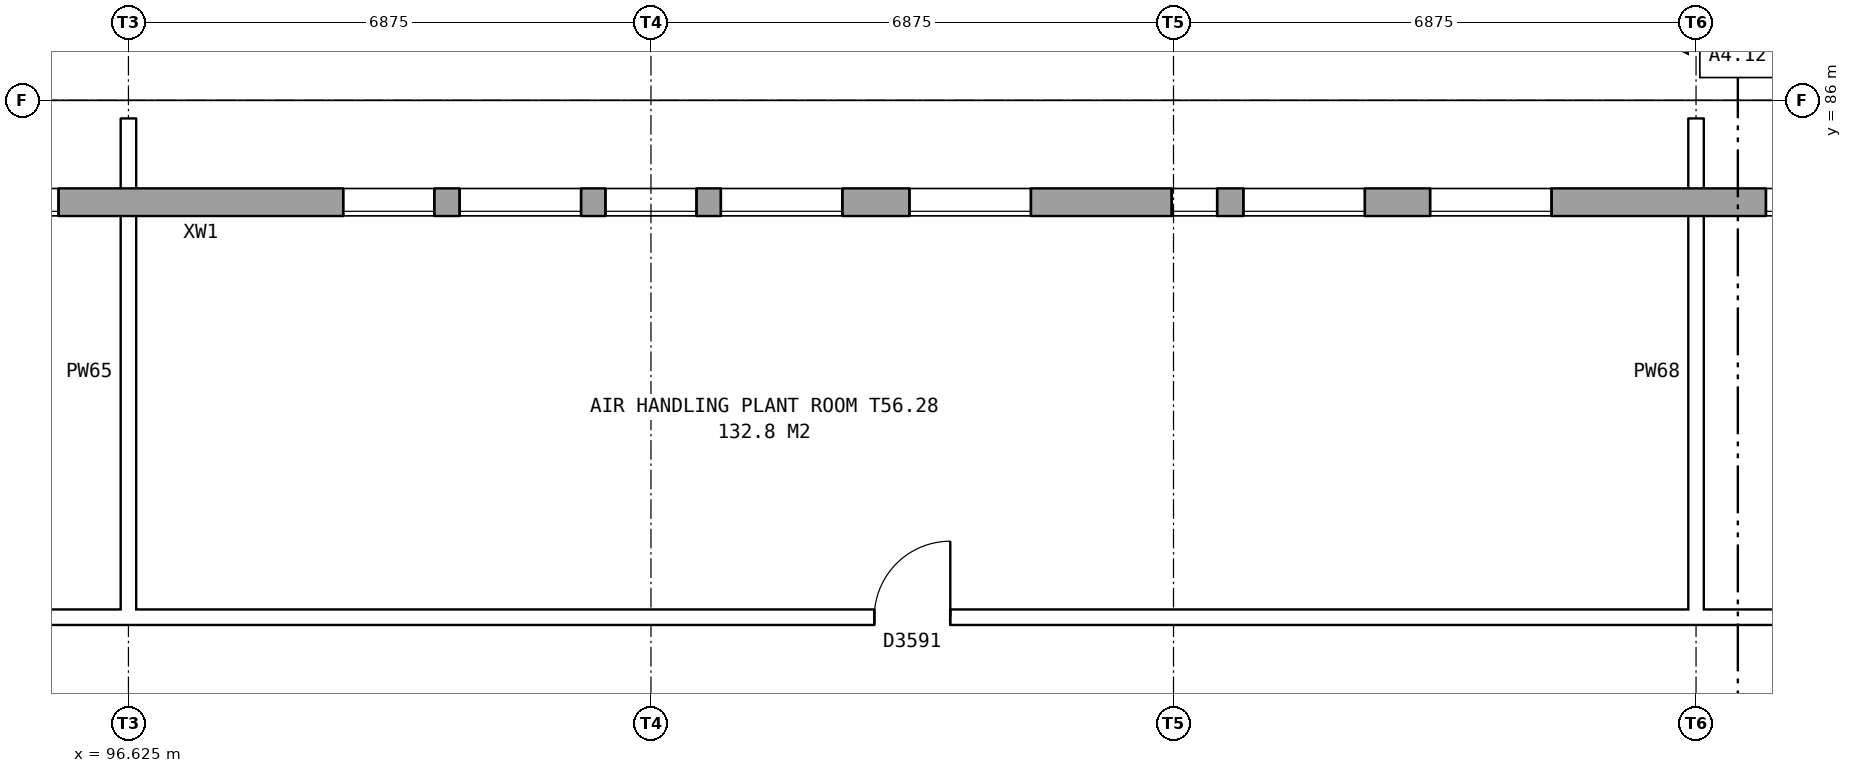
"""IFC4 building model, lengths in metres.
Left out: names, types, materials, properties, quantities, classifications, styles, units other than length and angle.
Written with IfcOpenShell. Run it as: python <this file> out.ifc"""

import sys

from ifc_helpers import new_model, si_unit, direction, frame, frame_2d, origin, place, context, subcontext, project, spatial, rectangle, extrude, element, fill, save


model = new_model("IFC4")
c1 = context("Model", 3, precision=1e-05, world=origin(), true_north=direction((0.0, 1.0)))
c2 = subcontext(c1, "Body", "Model", "MODEL_VIEW")
j1 = project(units=[si_unit("LENGTHUNIT", "METRE"), si_unit("PLANEANGLEUNIT", "RADIAN")], contexts=[c1])
p1 = place(None, origin())
s1 = spatial("IfcSite", under=j1, at=p1, CompositionType="ELEMENT")
p2 = place(p1, origin())
s2 = spatial("IfcBuilding", under=s1, at=p2, CompositionType="ELEMENT")
p3 = place(p2, frame((0.0, 0.0, 198.6)))
s3 = spatial("IfcBuildingStorey", under=s2, at=p3, CompositionType="ELEMENT", Elevation=198.6)
p4 = place(p3, frame((130.85, 84.66, 0.0), z_axis=(0.0, 0.0, 1.0), x_axis=(-1.0, 0.0, 0.0)))
e1 = element("IfcWall", 1, at=p4, inside=s3, PredefinedType="STANDARD", context=c2, shape_type="SweptSolid", body=[
    extrude(rectangle(XDim=54.7, YDim=0.36, at=frame_2d((27.35, 0.0))), origin(), (0.0, 0.0, 1.0), 3.7),
])
p5 = place(p4, frame((1.75, 0.0, 1.5)))
e2 = element("IfcOpeningElement", 2, at=p5, cuts=e1, PredefinedType="OPENING", context=c2, shape_type="SweptSolid", body=[
    extrude(rectangle(XDim=0.6, YDim=1.2, at=frame_2d((0.3, 0.6))), frame((0.0, 0.19, 0.0), z_axis=(0.0, -1.0, 0.0), x_axis=(1.0, 0.0, 0.0)), (0.0, 0.0, 1.0), 0.38),
])
p6 = place(p4, frame((4.206, 0.0, 1.5)))
e3 = element("IfcOpeningElement", 3, at=p6, cuts=e1, PredefinedType="OPENING", context=c2, shape_type="SweptSolid", body=[
    extrude(rectangle(XDim=1.6, YDim=1.2, at=frame_2d((0.8, 0.6))), frame((0.0, 0.19, 0.0), z_axis=(0.0, -1.0, 0.0), x_axis=(1.0, 0.0, 0.0)), (0.0, 0.0, 1.0), 0.38),
])
p7 = place(p4, frame((2.65, 0.0, 1.5)))
e4 = element("IfcOpeningElement", 4, at=p7, cuts=e1, PredefinedType="OPENING", context=c2, shape_type="SweptSolid", body=[
    extrude(rectangle(XDim=1.2, YDim=1.2, at=frame_2d((0.6, 0.6))), frame((0.0, 0.19, 0.0), z_axis=(0.0, -1.0, 0.0), x_axis=(1.0, 0.0, 0.0)), (0.0, 0.0, 1.0), 0.38),
])
p8 = place(p4, frame((11.081, 0.0, 1.5)))
e5 = element("IfcOpeningElement", 5, at=p8, cuts=e1, PredefinedType="OPENING", context=c2, shape_type="SweptSolid", body=[
    extrude(rectangle(XDim=1.6, YDim=1.2, at=frame_2d((0.8, 0.6))), frame((0.0, 0.19, 0.0), z_axis=(0.0, -1.0, 0.0), x_axis=(1.0, 0.0, 0.0)), (0.0, 0.0, 1.0), 0.38),
])
p9 = place(p4, frame((15.5, 0.0, 1.5)))
e6 = element("IfcOpeningElement", 6, at=p9, cuts=e1, PredefinedType="OPENING", context=c2, shape_type="SweptSolid", body=[
    extrude(rectangle(XDim=1.6, YDim=1.2, at=frame_2d((0.8, 0.6))), frame((0.0, 0.19, 0.0), z_axis=(0.0, -1.0, 0.0), x_axis=(1.0, 0.0, 0.0)), (0.0, 0.0, 1.0), 0.38),
])
p10 = place(p4, frame((17.956, 0.0, 1.5)))
e7 = element("IfcOpeningElement", 7, at=p10, cuts=e1, PredefinedType="OPENING", context=c2, shape_type="SweptSolid", body=[
    extrude(rectangle(XDim=1.6, YDim=1.2, at=frame_2d((0.8, 0.6))), frame((0.0, 0.19, 0.0), z_axis=(0.0, -1.0, 0.0), x_axis=(1.0, 0.0, 0.0)), (0.0, 0.0, 1.0), 0.38),
])
p11 = place(p4, frame((19.9, 0.0, 1.5)))
e8 = element("IfcOpeningElement", 8, at=p11, cuts=e1, PredefinedType="OPENING", context=c2, shape_type="SweptSolid", body=[
    extrude(rectangle(XDim=0.6, YDim=1.2, at=frame_2d((0.3, 0.6))), frame((0.0, 0.19, 0.0), z_axis=(0.0, -1.0, 0.0), x_axis=(1.0, 0.0, 0.0)), (0.0, 0.0, 1.0), 0.38),
])
p12 = place(p4, frame((24.831, 0.0, 1.5)))
e9 = element("IfcOpeningElement", 9, at=p12, cuts=e1, PredefinedType="OPENING", context=c2, shape_type="SweptSolid", body=[
    extrude(rectangle(XDim=1.6, YDim=1.2, at=frame_2d((0.8, 0.6))), frame((0.0, 0.19, 0.0), z_axis=(0.0, -1.0, 0.0), x_axis=(1.0, 0.0, 0.0)), (0.0, 0.0, 1.0), 0.38),
])
p13 = place(p4, frame((28.269, 0.0, 1.5)))
e10 = element("IfcOpeningElement", 10, at=p13, cuts=e1, PredefinedType="OPENING", context=c2, shape_type="SweptSolid", body=[
    extrude(rectangle(XDim=1.6, YDim=1.2, at=frame_2d((0.8, 0.6))), frame((0.0, 0.19, 0.0), z_axis=(0.0, -1.0, 0.0), x_axis=(1.0, 0.0, 0.0)), (0.0, 0.0, 1.0), 0.38),
])
p14 = place(p4, frame((22.35, 0.0, 1.5)))
e11 = element("IfcOpeningElement", 11, at=p14, cuts=e1, PredefinedType="OPENING", context=c2, shape_type="SweptSolid", body=[
    extrude(rectangle(XDim=1.6, YDim=1.2, at=frame_2d((0.8, 0.6))), frame((0.0, 0.19, 0.0), z_axis=(0.0, -1.0, 0.0), x_axis=(1.0, 0.0, 0.0)), (0.0, 0.0, 1.0), 0.38),
])
p15 = place(p4, frame((35.144, 0.0, 1.5)))
e12 = element("IfcOpeningElement", 12, at=p15, cuts=e1, PredefinedType="OPENING", context=c2, shape_type="SweptSolid", body=[
    extrude(rectangle(XDim=1.6, YDim=1.2, at=frame_2d((0.8, 0.6))), frame((0.0, 0.19, 0.0), z_axis=(0.0, -1.0, 0.0), x_axis=(1.0, 0.0, 0.0)), (0.0, 0.0, 1.0), 0.38),
])
p16 = place(p4, frame((37.075, 0.0, 1.5)))
e13 = element("IfcOpeningElement", 13, at=p16, cuts=e1, PredefinedType="OPENING", context=c2, shape_type="SweptSolid", body=[
    extrude(rectangle(XDim=0.6, YDim=1.2, at=frame_2d((0.3, 0.6))), frame((0.0, 0.19, 0.0), z_axis=(0.0, -1.0, 0.0), x_axis=(1.0, 0.0, 0.0)), (0.0, 0.0, 1.0), 0.38),
])
p17 = place(p4, frame((42.019, 0.0, 1.5)))
e14 = element("IfcOpeningElement", 14, at=p17, cuts=e1, PredefinedType="OPENING", context=c2, shape_type="SweptSolid", body=[
    extrude(rectangle(XDim=1.6, YDim=1.2, at=frame_2d((0.8, 0.6))), frame((0.0, 0.19, 0.0), z_axis=(0.0, -1.0, 0.0), x_axis=(1.0, 0.0, 0.0)), (0.0, 0.0, 1.0), 0.38),
])
p18 = place(p4, frame((37.975, 0.0, 1.5)))
e15 = element("IfcOpeningElement", 15, at=p18, cuts=e1, PredefinedType="OPENING", context=c2, shape_type="SweptSolid", body=[
    extrude(rectangle(XDim=1.2, YDim=1.2, at=frame_2d((0.6, 0.6))), frame((0.0, 0.19, 0.0), z_axis=(0.0, -1.0, 0.0), x_axis=(1.0, 0.0, 0.0)), (0.0, 0.0, 1.0), 0.38),
])
p19 = place(p4, frame((48.894, 0.0, 1.5)))
e16 = element("IfcOpeningElement", 16, at=p19, cuts=e1, PredefinedType="OPENING", context=c2, shape_type="SweptSolid", body=[
    extrude(rectangle(XDim=1.6, YDim=1.2, at=frame_2d((0.8, 0.6))), frame((0.0, 0.19, 0.0), z_axis=(0.0, -1.0, 0.0), x_axis=(1.0, 0.0, 0.0)), (0.0, 0.0, 1.0), 0.38),
])
p20 = place(p4, frame((41.075, 0.0, 1.5)))
e17 = element("IfcOpeningElement", 17, at=p20, cuts=e1, PredefinedType="OPENING", context=c2, shape_type="SweptSolid", body=[
    extrude(rectangle(XDim=0.6, YDim=1.2, at=frame_2d((0.3, 0.6))), frame((0.0, 0.19, 0.0), z_axis=(0.0, -1.0, 0.0), x_axis=(1.0, 0.0, 0.0)), (0.0, 0.0, 1.0), 0.38),
])
p21 = place(p4, frame((6.15, 0.0, 1.5)))
e18 = element("IfcOpeningElement", 18, at=p21, cuts=e1, PredefinedType="OPENING", context=c2, shape_type="SweptSolid", body=[
    extrude(rectangle(XDim=0.6, YDim=1.2, at=frame_2d((0.3, 0.6))), frame((0.0, 0.19, 0.0), z_axis=(0.0, -1.0, 0.0), x_axis=(1.0, 0.0, 0.0)), (0.0, 0.0, 1.0), 0.38),
])
p22 = place(p4, frame((8.6, 0.0, 1.5)))
e19 = element("IfcOpeningElement", 19, at=p22, cuts=e1, PredefinedType="OPENING", context=c2, shape_type="SweptSolid", body=[
    extrude(rectangle(XDim=1.6, YDim=1.2, at=frame_2d((0.8, 0.6))), frame((0.0, 0.19, 0.0), z_axis=(0.0, -1.0, 0.0), x_axis=(1.0, 0.0, 0.0)), (0.0, 0.0, 1.0), 0.38),
])
p23 = place(p4, frame((26.75, 0.0, 1.5)))
e20 = element("IfcOpeningElement", 20, at=p23, cuts=e1, PredefinedType="OPENING", context=c2, shape_type="SweptSolid", body=[
    extrude(rectangle(XDim=1.2, YDim=1.2, at=frame_2d((0.6, 0.6))), frame((0.0, 0.19, 0.0), z_axis=(0.0, -1.0, 0.0), x_axis=(1.0, 0.0, 0.0)), (0.0, 0.0, 1.0), 0.38),
])
p24 = place(p4, frame((30.2, 0.0, 1.5)))
e21 = element("IfcOpeningElement", 21, at=p24, cuts=e1, PredefinedType="OPENING", context=c2, shape_type="SweptSolid", body=[
    extrude(rectangle(XDim=1.2, YDim=1.2, at=frame_2d((0.6, 0.6))), frame((0.0, 0.19, 0.0), z_axis=(0.0, -1.0, 0.0), x_axis=(1.0, 0.0, 0.0)), (0.0, 0.0, 1.0), 0.38),
])
p25 = place(p4, frame((43.925, 0.0, 1.5)))
e22 = element("IfcOpeningElement", 22, at=p25, cuts=e1, PredefinedType="OPENING", context=c2, shape_type="SweptSolid", body=[
    extrude(rectangle(XDim=1.6, YDim=1.2, at=frame_2d((0.8, 0.6))), frame((0.0, 0.19, 0.0), z_axis=(0.0, -1.0, 0.0), x_axis=(1.0, 0.0, 0.0)), (0.0, 0.0, 1.0), 0.38),
])
p26 = place(p4, frame((47.925, 0.0, 1.5)))
e23 = element("IfcOpeningElement", 23, at=p26, cuts=e1, PredefinedType="OPENING", context=c2, shape_type="SweptSolid", body=[
    extrude(rectangle(XDim=0.6, YDim=1.2, at=frame_2d((0.3, 0.6))), frame((0.0, 0.19, 0.0), z_axis=(0.0, -1.0, 0.0), x_axis=(1.0, 0.0, 0.0)), (0.0, 0.0, 1.0), 0.38),
])
p27 = place(p4, frame((50.825, 0.0, 1.5)))
e24 = element("IfcOpeningElement", 24, at=p27, cuts=e1, PredefinedType="OPENING", context=c2, shape_type="SweptSolid", body=[
    extrude(rectangle(XDim=1.6, YDim=1.2, at=frame_2d((0.8, 0.6))), frame((0.0, 0.19, 0.0), z_axis=(0.0, -1.0, 0.0), x_axis=(1.0, 0.0, 0.0)), (0.0, 0.0, 1.0), 0.38),
])
p28 = place(p3, frame((32.24, 79.2, 0.0), z_axis=(0.0, 0.0, 1.0), x_axis=(1.0, 0.0, 0.0)))
e25 = element("IfcWall", 25, at=p28, inside=s3, PredefinedType="PARTITIONING", context=c2, shape_type="SweptSolid", body=[
    extrude(rectangle(XDim=99.22, YDim=0.2, at=frame_2d((49.61, 0.0))), origin(), (0.0, 0.0, 1.0), 3.7),
])
p29 = place(p28, frame((3.44, 0.0, 0.0)))
e26 = element("IfcOpeningElement", 26, at=p29, cuts=e25, PredefinedType="OPENING", context=c2, shape_type="SweptSolid", body=[
    extrude(rectangle(XDim=1.0, YDim=2.1, at=frame_2d((0.5, 1.05))), frame((0.0, 0.11, 0.0), z_axis=(0.0, -1.0, 0.0), x_axis=(1.0, 0.0, 0.0)), (0.0, 0.0, 1.0), 0.22),
])
p30 = place(p28, frame((11.76, 0.0, 0.0)))
e27 = element("IfcOpeningElement", 27, at=p30, cuts=e25, PredefinedType="OPENING", context=c2, shape_type="SweptSolid", body=[
    extrude(rectangle(XDim=1.0, YDim=2.1, at=frame_2d((0.5, 1.05))), frame((0.0, 0.11, 0.0), z_axis=(0.0, -1.0, 0.0), x_axis=(1.0, 0.0, 0.0)), (0.0, 0.0, 1.0), 0.22),
])
p31 = place(p28, frame((22.26, 0.0, 0.0)))
e28 = element("IfcOpeningElement", 28, at=p31, cuts=e25, PredefinedType="OPENING", context=c2, shape_type="SweptSolid", body=[
    extrude(rectangle(XDim=1.0, YDim=2.1, at=frame_2d((0.5, 1.05))), frame((0.0, 0.11, 0.0), z_axis=(0.0, -1.0, 0.0), x_axis=(1.0, 0.0, 0.0)), (0.0, 0.0, 1.0), 0.22),
])
p32 = place(p28, frame((35.58, 0.0, 0.0)))
e29 = element("IfcOpeningElement", 29, at=p32, cuts=e25, PredefinedType="OPENING", context=c2, shape_type="SweptSolid", body=[
    extrude(rectangle(XDim=1.0, YDim=2.1, at=frame_2d((0.5, 1.05))), frame((0.0, 0.11, 0.0), z_axis=(0.0, -1.0, 0.0), x_axis=(1.0, 0.0, 0.0)), (0.0, 0.0, 1.0), 0.22),
])
p33 = place(p28, frame((53.392, 0.0, 0.0)))
e30 = element("IfcOpeningElement", 30, at=p33, cuts=e25, PredefinedType="OPENING", context=c2, shape_type="SweptSolid", body=[
    extrude(rectangle(XDim=1.0, YDim=2.1, at=frame_2d((0.5, 1.05))), frame((0.0, 0.11, 0.0), z_axis=(0.0, -1.0, 0.0), x_axis=(1.0, 0.0, 0.0)), (0.0, 0.0, 1.0), 0.22),
])
p34 = place(p28, frame((74.198, 0.0, 0.0)))
e31 = element("IfcOpeningElement", 31, at=p34, cuts=e25, PredefinedType="OPENING", context=c2, shape_type="SweptSolid", body=[
    extrude(rectangle(XDim=1.0, YDim=2.1, at=frame_2d((0.5, 1.05))), frame((0.0, 0.11, 0.0), z_axis=(0.0, -1.0, 0.0), x_axis=(1.0, 0.0, 0.0)), (0.0, 0.0, 1.0), 0.22),
])
p35 = place(p28, frame((91.565, 0.0, 0.0)))
e32 = element("IfcOpeningElement", 32, at=p35, cuts=e25, PredefinedType="OPENING", context=c2, shape_type="SweptSolid", body=[
    extrude(rectangle(XDim=1.0, YDim=2.1, at=frame_2d((0.5, 1.05))), frame((0.0, 0.11, 0.0), z_axis=(0.0, -1.0, 0.0), x_axis=(1.0, 0.0, 0.0)), (0.0, 0.0, 1.0), 0.22),
])
for number, where, z_axis, x_axis in (
    (33, (96.625, 79.1, 0.0), (0.0, 0.0, 1.0), (0.0, 1.0, 0.0)),
    (34, (117.25, 79.1, 0.0), (0.0, 0.0, 1.0), (0.0, 1.0, 0.0)),
):
    element("IfcWall", number, at=place(p3, frame(where, z_axis=z_axis, x_axis=x_axis)), inside=s3, PredefinedType="PARTITIONING", context=c2, shape_type="SweptSolid", body=[
        extrude(rectangle(XDim=6.66, YDim=0.2, at=frame_2d((3.33, 0.0))), origin(), (0.0, 0.0, 1.0), 3.167),
    ])
p36 = place(p8, origin())
e35 = element("IfcWindow", 35, at=p36, inside=s3, PartitioningType="DOUBLE_PANEL_HORIZONTAL", PredefinedType="WINDOW", context=c2, shape_type="SweptSolid", body=[
    extrude(rectangle(XDim=1.6, YDim=1.2, at=frame_2d((0.8, 0.6))), frame((0.0, 0.15, 0.0), z_axis=(0.0, -1.0, 0.0), x_axis=(1.0, 0.0, 0.0)), (0.0, 0.0, 1.0), 0.06),
])
fill(e5, e35)
p37 = place(p9, origin())
e36 = element("IfcWindow", 36, at=p37, inside=s3, PartitioningType="DOUBLE_PANEL_HORIZONTAL", PredefinedType="WINDOW", context=c2, shape_type="SweptSolid", body=[
    extrude(rectangle(XDim=1.6, YDim=1.2, at=frame_2d((0.8, 0.6))), frame((0.0, 0.15, 0.0), z_axis=(0.0, -1.0, 0.0), x_axis=(1.0, 0.0, 0.0)), (0.0, 0.0, 1.0), 0.06),
])
fill(e6, e36)
p38 = place(p10, origin())
e37 = element("IfcWindow", 37, at=p38, inside=s3, PartitioningType="DOUBLE_PANEL_HORIZONTAL", PredefinedType="WINDOW", context=c2, shape_type="SweptSolid", body=[
    extrude(rectangle(XDim=1.6, YDim=1.2, at=frame_2d((0.8, 0.6))), frame((0.0, 0.15, 0.0), z_axis=(0.0, -1.0, 0.0), x_axis=(1.0, 0.0, 0.0)), (0.0, 0.0, 1.0), 0.06),
])
fill(e7, e37)
p39 = place(p11, origin())
e38 = element("IfcWindow", 38, at=p39, inside=s3, PartitioningType="DOUBLE_PANEL_HORIZONTAL", PredefinedType="WINDOW", context=c2, shape_type="SweptSolid", body=[
    extrude(rectangle(XDim=0.6, YDim=1.2, at=frame_2d((0.3, 0.6))), frame((0.0, 0.15, 0.0), z_axis=(0.0, -1.0, 0.0), x_axis=(1.0, 0.0, 0.0)), (0.0, 0.0, 1.0), 0.06),
])
fill(e8, e38)
p40 = place(p12, origin())
e39 = element("IfcWindow", 39, at=p40, inside=s3, PartitioningType="DOUBLE_PANEL_HORIZONTAL", PredefinedType="WINDOW", context=c2, shape_type="SweptSolid", body=[
    extrude(rectangle(XDim=1.6, YDim=1.2, at=frame_2d((0.8, 0.6))), frame((0.0, 0.15, 0.0), z_axis=(0.0, -1.0, 0.0), x_axis=(1.0, 0.0, 0.0)), (0.0, 0.0, 1.0), 0.06),
])
fill(e9, e39)
p41 = place(p13, origin())
e40 = element("IfcWindow", 40, at=p41, inside=s3, PartitioningType="DOUBLE_PANEL_HORIZONTAL", PredefinedType="WINDOW", context=c2, shape_type="SweptSolid", body=[
    extrude(rectangle(XDim=1.6, YDim=1.2, at=frame_2d((0.8, 0.6))), frame((0.0, 0.15, 0.0), z_axis=(0.0, -1.0, 0.0), x_axis=(1.0, 0.0, 0.0)), (0.0, 0.0, 1.0), 0.06),
])
fill(e10, e40)
p42 = place(p14, origin())
e41 = element("IfcWindow", 41, at=p42, inside=s3, PartitioningType="DOUBLE_PANEL_HORIZONTAL", PredefinedType="WINDOW", context=c2, shape_type="SweptSolid", body=[
    extrude(rectangle(XDim=1.6, YDim=1.2, at=frame_2d((0.8, 0.6))), frame((0.0, 0.15, 0.0), z_axis=(0.0, -1.0, 0.0), x_axis=(1.0, 0.0, 0.0)), (0.0, 0.0, 1.0), 0.06),
])
fill(e11, e41)
p43 = place(p15, origin())
e42 = element("IfcWindow", 42, at=p43, inside=s3, PartitioningType="DOUBLE_PANEL_HORIZONTAL", PredefinedType="WINDOW", context=c2, shape_type="SweptSolid", body=[
    extrude(rectangle(XDim=1.6, YDim=1.2, at=frame_2d((0.8, 0.6))), frame((0.0, 0.15, 0.0), z_axis=(0.0, -1.0, 0.0), x_axis=(1.0, 0.0, 0.0)), (0.0, 0.0, 1.0), 0.06),
])
fill(e12, e42)
p44 = place(p34, origin())
e43 = element("IfcDoor", 43, at=p44, inside=s3, OperationType="SINGLE_SWING_RIGHT", PredefinedType="DOOR", context=c2, shape_type="SweptSolid", body=[
    extrude(rectangle(XDim=1.0, YDim=2.1, at=frame_2d((0.5, 1.05))), frame((0.0, 0.025, 0.0), z_axis=(0.0, -1.0, 0.0), x_axis=(1.0, 0.0, 0.0)), (0.0, 0.0, 1.0), 0.05),
])
fill(e31, e43)
p45 = place(p23, origin())
e44 = element("IfcWindow", 44, at=p45, inside=s3, PartitioningType="DOUBLE_PANEL_HORIZONTAL", PredefinedType="WINDOW", context=c2, shape_type="SweptSolid", body=[
    extrude(rectangle(XDim=1.2, YDim=1.2, at=frame_2d((0.6, 0.6))), frame((0.0, 0.15, 0.0), z_axis=(0.0, -1.0, 0.0), x_axis=(1.0, 0.0, 0.0)), (0.0, 0.0, 1.0), 0.06),
])
fill(e20, e44)
p46 = place(p24, origin())
e45 = element("IfcWindow", 45, at=p46, inside=s3, PartitioningType="DOUBLE_PANEL_HORIZONTAL", PredefinedType="WINDOW", context=c2, shape_type="SweptSolid", body=[
    extrude(rectangle(XDim=1.2, YDim=1.2, at=frame_2d((0.6, 0.6))), frame((0.0, 0.15, 0.0), z_axis=(0.0, -1.0, 0.0), x_axis=(1.0, 0.0, 0.0)), (0.0, 0.0, 1.0), 0.06),
])
fill(e21, e45)
save(model, sys.argv[1])
